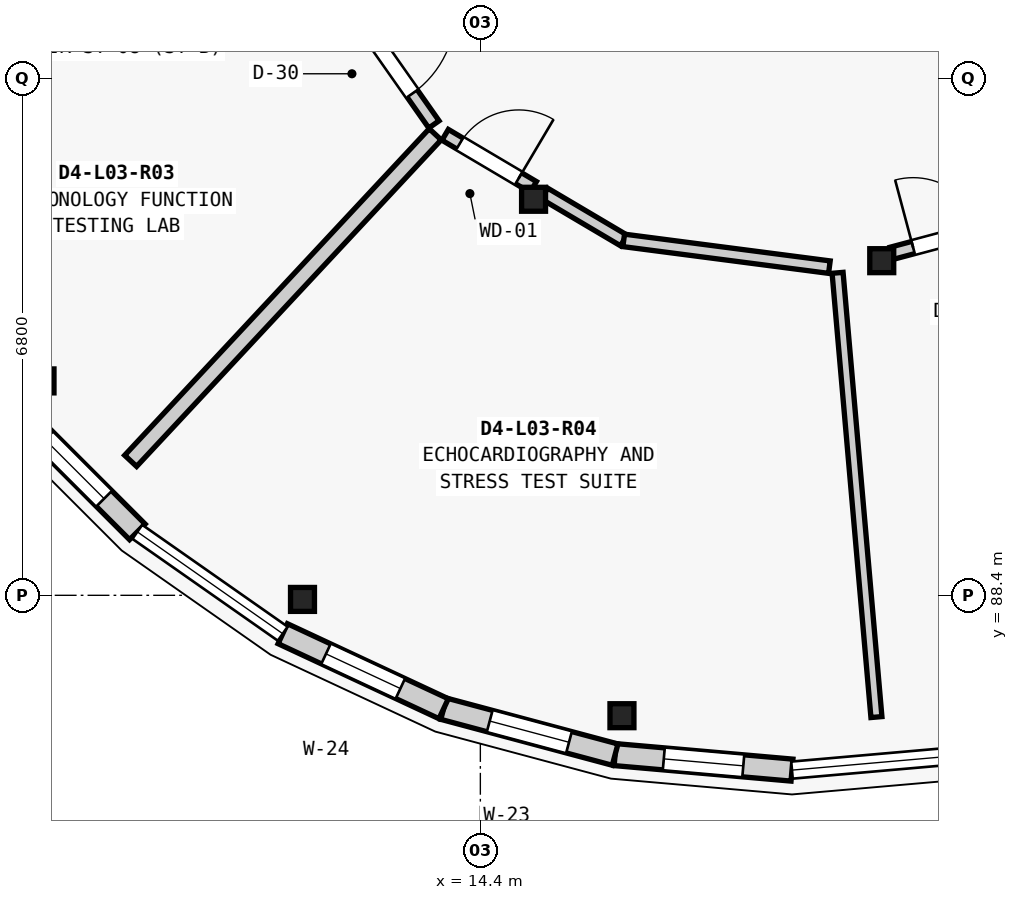
"""IFC4 building model, lengths in metres.
Left out: names, types, materials, properties, quantities, classifications, styles, units other than length and angle.
Written with IfcOpenShell. Run it as: python <this file> out.ifc"""

import sys

from ifc_helpers import new_model, si_unit, direction, frame, frame_2d, origin, origin_2d, place, context, subcontext, project, spatial, rectangle, extrude, element, fill, save


model = new_model("IFC4")
c1 = context("Model", 3, precision=1e-05, world=origin(), true_north=direction((0.0, 1.0)))
c2 = subcontext(c1, "Body", "Model", "MODEL_VIEW")
j1 = project(units=[si_unit("LENGTHUNIT", "METRE"), si_unit("PLANEANGLEUNIT", "RADIAN")], contexts=[c1])
p1 = place(None, origin())
s1 = spatial("IfcSite", under=j1, at=p1, CompositionType="ELEMENT")
p2 = place(p1, origin())
s2 = spatial("IfcBuilding", under=s1, at=p2, CompositionType="ELEMENT")
p3 = place(p2, frame((0.0, 0.0, 12.95)))
s3 = spatial("IfcBuildingStorey", under=s2, at=p3, CompositionType="ELEMENT", Elevation=12.95)
for number, where, z_axis, x_axis in (
    (1, (8.633, 91.221, 0.0), (0.0, 0.0, 1.0), (1.0, 0.0, 0.0)),
    (2, (12.06, 88.346, 0.0), (0.0, 0.0, 1.0), (1.0, 0.0, 0.0)),
    (3, (16.263, 86.816, 0.0), (0.0, 0.0, 1.0), (1.0, 0.0, 0.0)),
    (4, (15.1, 93.611, 0.0), (0.0, 0.0, 1.0), (1.0, 0.0, 0.0)),
    (5, (19.681, 92.803, 0.0), (0.0, 0.0, 1.0), (1.0, 0.0, 0.0)),
):
    element("IfcColumn", number, at=place(p3, frame(where, z_axis=z_axis, x_axis=x_axis)), inside=s3, PredefinedType="COLUMN", context=c2, shape_type="SweptSolid", body=[
        extrude(rectangle(XDim=0.315, YDim=0.315, at=origin_2d()), origin(), (0.0, 0.0, 1.0), 4.2),
    ])
p4 = place(p3, frame((18.5, 86.1, 0.0), z_axis=(0.0, 0.0, 1.0), x_axis=(-0.996184295282, 0.087274565792, 0.0)))
e6 = element("IfcWall", 6, at=p4, inside=s3, PredefinedType="ELEMENTEDWALL", context=c2, shape_type="SweptSolid", body=[
    extrude(rectangle(XDim=2.336, YDim=0.29, at=frame_2d((1.168, 0.0))), origin(), (0.0, 0.0, 1.0), 3.349),
])
p5 = place(p4, frame((0.643, 0.0, 0.85)))
e7 = element("IfcOpeningElement", 7, at=p5, cuts=e6, PredefinedType="OPENING", context=c2, shape_type="SweptSolid", body=[
    extrude(rectangle(XDim=1.05, YDim=2.15, at=frame_2d((0.525, 1.075))), frame((0.0, 0.155, 0.0), z_axis=(0.0, -1.0, 0.0), x_axis=(1.0, 0.0, 0.0)), (0.0, 0.0, 1.0), 0.31),
])
p6 = place(p3, frame((16.173, 86.304, 0.0), z_axis=(0.0, 0.0, 1.0), x_axis=(-0.965981166673, 0.258612423585, 0.0)))
e8 = element("IfcWall", 8, at=p6, inside=s3, PredefinedType="ELEMENTEDWALL", context=c2, shape_type="SweptSolid", body=[
    extrude(rectangle(XDim=2.335, YDim=0.29, at=frame_2d((1.168, 0.0))), origin(), (0.0, 0.0, 1.0), 3.349),
])
p7 = place(p6, frame((0.628, 0.0, 0.85)))
e9 = element("IfcOpeningElement", 9, at=p7, cuts=e8, PredefinedType="OPENING", context=c2, shape_type="SweptSolid", body=[
    extrude(rectangle(XDim=1.08, YDim=1.5, at=frame_2d((0.54, 0.75))), frame((0.0, 0.155, 0.0), z_axis=(0.0, -1.0, 0.0), x_axis=(1.0, 0.0, 0.0)), (0.0, 0.0, 1.0), 0.31),
])
p8 = place(p3, frame((13.917, 86.908, 0.0), z_axis=(0.0, 0.0, 1.0), x_axis=(-0.906321946979, 0.422587894318, 0.0)))
e10 = element("IfcWall", 10, at=p8, inside=s3, PredefinedType="ELEMENTEDWALL", context=c2, shape_type="SweptSolid", body=[
    extrude(rectangle(XDim=2.336, YDim=0.29, at=frame_2d((1.168, 0.0))), origin(), (0.0, 0.0, 1.0), 3.349),
])
p9 = place(p8, frame((0.628, 0.0, 0.85)))
e11 = element("IfcOpeningElement", 11, at=p9, cuts=e10, PredefinedType="OPENING", context=c2, shape_type="SweptSolid", body=[
    extrude(rectangle(XDim=1.08, YDim=1.8, at=frame_2d((0.54, 0.9))), frame((0.0, 0.155, 0.0), z_axis=(0.0, -1.0, 0.0), x_axis=(1.0, 0.0, 0.0)), (0.0, 0.0, 1.0), 0.31),
])
p10 = place(p3, frame((9.887, 89.235, 0.0), z_axis=(0.0, 0.0, 1.0), x_axis=(-0.707106781187, 0.707106781187, 0.0)))
e12 = element("IfcWall", 12, at=p10, inside=s3, PredefinedType="ELEMENTEDWALL", context=c2, shape_type="SweptSolid", body=[
    extrude(rectangle(XDim=2.336, YDim=0.29, at=frame_2d((1.168, 0.0))), origin(), (0.0, 0.0, 1.0), 3.349),
])
p11 = place(p10, frame((0.618, 0.0, 0.85)))
e13 = element("IfcOpeningElement", 13, at=p11, cuts=e12, PredefinedType="OPENING", context=c2, shape_type="SweptSolid", body=[
    extrude(rectangle(XDim=1.1, YDim=1.25, at=frame_2d((0.55, 0.625))), frame((0.0, 0.155, 0.0), z_axis=(0.0, -1.0, 0.0), x_axis=(1.0, 0.0, 0.0)), (0.0, 0.0, 1.0), 0.31),
])
p12 = place(p3, frame((13.806, 94.466, 0.0), z_axis=(0.0, 0.0, 1.0), x_axis=(-0.681971732264, -0.731378531537, 0.0)))
e14 = element("IfcWall", 14, at=p12, inside=s3, PredefinedType="SOLIDWALL", context=c2, shape_type="SweptSolid", body=[
    extrude(rectangle(XDim=5.875, YDim=0.215, at=frame_2d((2.938, 0.0))), origin(), (0.0, 0.0, 1.0), 3.324),
])
p13 = place(p3, frame((19.1, 92.643, 0.0), z_axis=(0.0, 0.0, 1.0), x_axis=(0.087091071421, -0.996200353984, 0.0)))
e15 = element("IfcWall", 15, at=p13, inside=s3, PredefinedType="PARTITIONING", context=c2, shape_type="SweptSolid", body=[
    extrude(rectangle(XDim=5.867, YDim=0.145, at=frame_2d((2.934, 0.0))), origin(), (0.0, 0.0, 1.0), 3.324),
])
p14 = place(p3, frame((12.45, 96.503, 0.0), z_axis=(0.0, 0.0, 1.0), x_axis=(0.574678200401, -0.818379475539, 0.0)))
e16 = element("IfcWall", 16, at=p14, inside=s3, PredefinedType="PARTITIONING", context=c2, shape_type="SweptSolid", body=[
    extrude(rectangle(XDim=2.33, YDim=0.165, at=frame_2d((1.165, 0.0))), origin(), (0.0, 0.0, 1.0), 3.324),
])
p15 = place(p14, frame((0.495, 0.0, 0.0)))
e17 = element("IfcOpeningElement", 17, at=p15, cuts=e16, PredefinedType="OPENING", context=c2, shape_type="SweptSolid", body=[
    extrude(rectangle(XDim=1.34, YDim=2.32, at=frame_2d((0.67, 1.16))), frame((0.0, 0.093, 0.0), z_axis=(0.0, -1.0, 0.0), x_axis=(1.0, 0.0, 0.0)), (0.0, 0.0, 1.0), 0.185),
])
p16 = place(p3, frame((13.937, 94.459, 0.0), z_axis=(0.0, 0.0, 1.0), x_axis=(0.860532897503, -0.509394868756, 0.0)))
e18 = element("IfcWall", 18, at=p16, inside=s3, PredefinedType="PARTITIONING", context=c2, shape_type="SweptSolid", body=[
    extrude(rectangle(XDim=1.347, YDim=0.165, at=frame_2d((0.673, 0.0))), origin(), (0.0, 0.0, 1.0), 3.324),
])
p17 = place(p16, frame((0.224, 0.0, 0.0)))
e19 = element("IfcOpeningElement", 19, at=p17, cuts=e18, PredefinedType="OPENING", context=c2, shape_type="SweptSolid", body=[
    extrude(rectangle(XDim=0.9, YDim=2.1, at=frame_2d((0.45, 1.05))), frame((0.0, 0.093, 0.0), z_axis=(0.0, -1.0, 0.0), x_axis=(1.0, 0.0, 0.0)), (0.0, 0.0, 1.0), 0.185),
])
p18 = place(p3, frame((15.244, 93.686, 0.0), z_axis=(0.0, 0.0, 1.0), x_axis=(0.860838176747, -0.508878800359, 0.0)))
e20 = element("IfcWall", 20, at=p18, inside=s3, PredefinedType="PARTITIONING", context=c2, shape_type="SweptSolid", body=[
    extrude(rectangle(XDim=1.21, YDim=0.165, at=frame_2d((0.605, 0.0))), origin(), (0.0, 0.0, 1.0), 3.324),
])
p19 = place(p3, frame((16.286, 93.07, 0.0), z_axis=(0.0, 0.0, 1.0), x_axis=(0.991643260492, -0.12901024735, 0.0)))
e21 = element("IfcWall", 21, at=p19, inside=s3, PredefinedType="PARTITIONING", context=c2, shape_type="SweptSolid", body=[
    extrude(rectangle(XDim=2.729, YDim=0.165, at=frame_2d((1.364, 0.0))), origin(), (0.0, 0.0, 1.0), 3.324),
])
p20 = place(p3, frame((19.811, 92.9, 0.0), z_axis=(0.0, 0.0, 1.0), x_axis=(0.966208027206, 0.257763550882, 0.0)))
e22 = element("IfcWall", 22, at=p20, inside=s3, PredefinedType="PARTITIONING", context=c2, shape_type="SweptSolid", body=[
    extrude(rectangle(XDim=1.506, YDim=0.165, at=frame_2d((0.753, 0.0))), origin(), (0.0, 0.0, 1.0), 3.324),
])
p21 = place(p20, frame((0.293, 0.0, 0.0)))
e23 = element("IfcOpeningElement", 23, at=p21, cuts=e22, PredefinedType="OPENING", context=c2, shape_type="SweptSolid", body=[
    extrude(rectangle(XDim=0.92, YDim=2.12, at=frame_2d((0.46, 1.06))), frame((0.0, 0.093, 0.0), z_axis=(0.0, -1.0, 0.0), x_axis=(1.0, 0.0, 0.0)), (0.0, 0.0, 1.0), 0.185),
])
p22 = place(p5, origin())
e24 = element("IfcWindow", 24, at=p22, inside=s3, PartitioningType="SINGLE_PANEL", PredefinedType="WINDOW", context=c2, shape_type="SweptSolid", body=[
    extrude(rectangle(XDim=1.05, YDim=2.15, at=frame_2d((0.525, 1.075))), frame((0.0, 0.03, 0.0), z_axis=(0.0, -1.0, 0.0), x_axis=(1.0, 0.0, 0.0)), (0.0, 0.0, 1.0), 0.06),
])
fill(e7, e24)
p23 = place(p7, origin())
e25 = element("IfcWindow", 25, at=p23, inside=s3, PartitioningType="SINGLE_PANEL", PredefinedType="WINDOW", context=c2, shape_type="SweptSolid", body=[
    extrude(rectangle(XDim=1.08, YDim=1.5, at=frame_2d((0.54, 0.75))), frame((0.0, 0.03, 0.0), z_axis=(0.0, -1.0, 0.0), x_axis=(1.0, 0.0, 0.0)), (0.0, 0.0, 1.0), 0.06),
])
fill(e9, e25)
p24 = place(p9, origin())
e26 = element("IfcWindow", 26, at=p24, inside=s3, PartitioningType="SINGLE_PANEL", PredefinedType="WINDOW", context=c2, shape_type="SweptSolid", body=[
    extrude(rectangle(XDim=1.08, YDim=1.8, at=frame_2d((0.54, 0.9))), frame((0.0, 0.03, 0.0), z_axis=(0.0, -1.0, 0.0), x_axis=(1.0, 0.0, 0.0)), (0.0, 0.0, 1.0), 0.06),
])
fill(e11, e26)
p25 = place(p11, origin())
e27 = element("IfcWindow", 27, at=p25, inside=s3, PartitioningType="SINGLE_PANEL", PredefinedType="WINDOW", context=c2, shape_type="SweptSolid", body=[
    extrude(rectangle(XDim=1.1, YDim=1.25, at=frame_2d((0.55, 0.625))), frame((0.0, 0.03, 0.0), z_axis=(0.0, -1.0, 0.0), x_axis=(1.0, 0.0, 0.0)), (0.0, 0.0, 1.0), 0.06),
])
fill(e13, e27)
p26 = place(p15, origin())
e28 = element("IfcDoor", 28, at=p26, inside=s3, OperationType="SINGLE_SWING_LEFT", PredefinedType="DOOR", context=c2, shape_type="SweptSolid", body=[
    extrude(rectangle(XDim=1.34, YDim=2.32, at=frame_2d((0.67, 1.16))), frame((0.0, 0.025, 0.0), z_axis=(0.0, -1.0, 0.0), x_axis=(1.0, 0.0, 0.0)), (0.0, 0.0, 1.0), 0.05),
])
fill(e17, e28)
p27 = place(p17, origin())
e29 = element("IfcDoor", 29, at=p27, inside=s3, OperationType="SINGLE_SWING_RIGHT", PredefinedType="DOOR", context=c2, shape_type="SweptSolid", body=[
    extrude(rectangle(XDim=0.9, YDim=2.1, at=frame_2d((0.45, 1.05))), frame((0.0, 0.025, 0.0), z_axis=(0.0, -1.0, 0.0), x_axis=(1.0, 0.0, 0.0)), (0.0, 0.0, 1.0), 0.05),
])
fill(e19, e29)
p28 = place(p21, origin())
e30 = element("IfcDoor", 30, at=p28, inside=s3, OperationType="SINGLE_SWING_LEFT", PredefinedType="DOOR", context=c2, shape_type="SweptSolid", body=[
    extrude(rectangle(XDim=0.92, YDim=2.12, at=frame_2d((0.46, 1.06))), frame((0.0, 0.025, 0.0), z_axis=(0.0, -1.0, 0.0), x_axis=(1.0, 0.0, 0.0)), (0.0, 0.0, 1.0), 0.05),
])
fill(e23, e30)
save(model, sys.argv[1])
